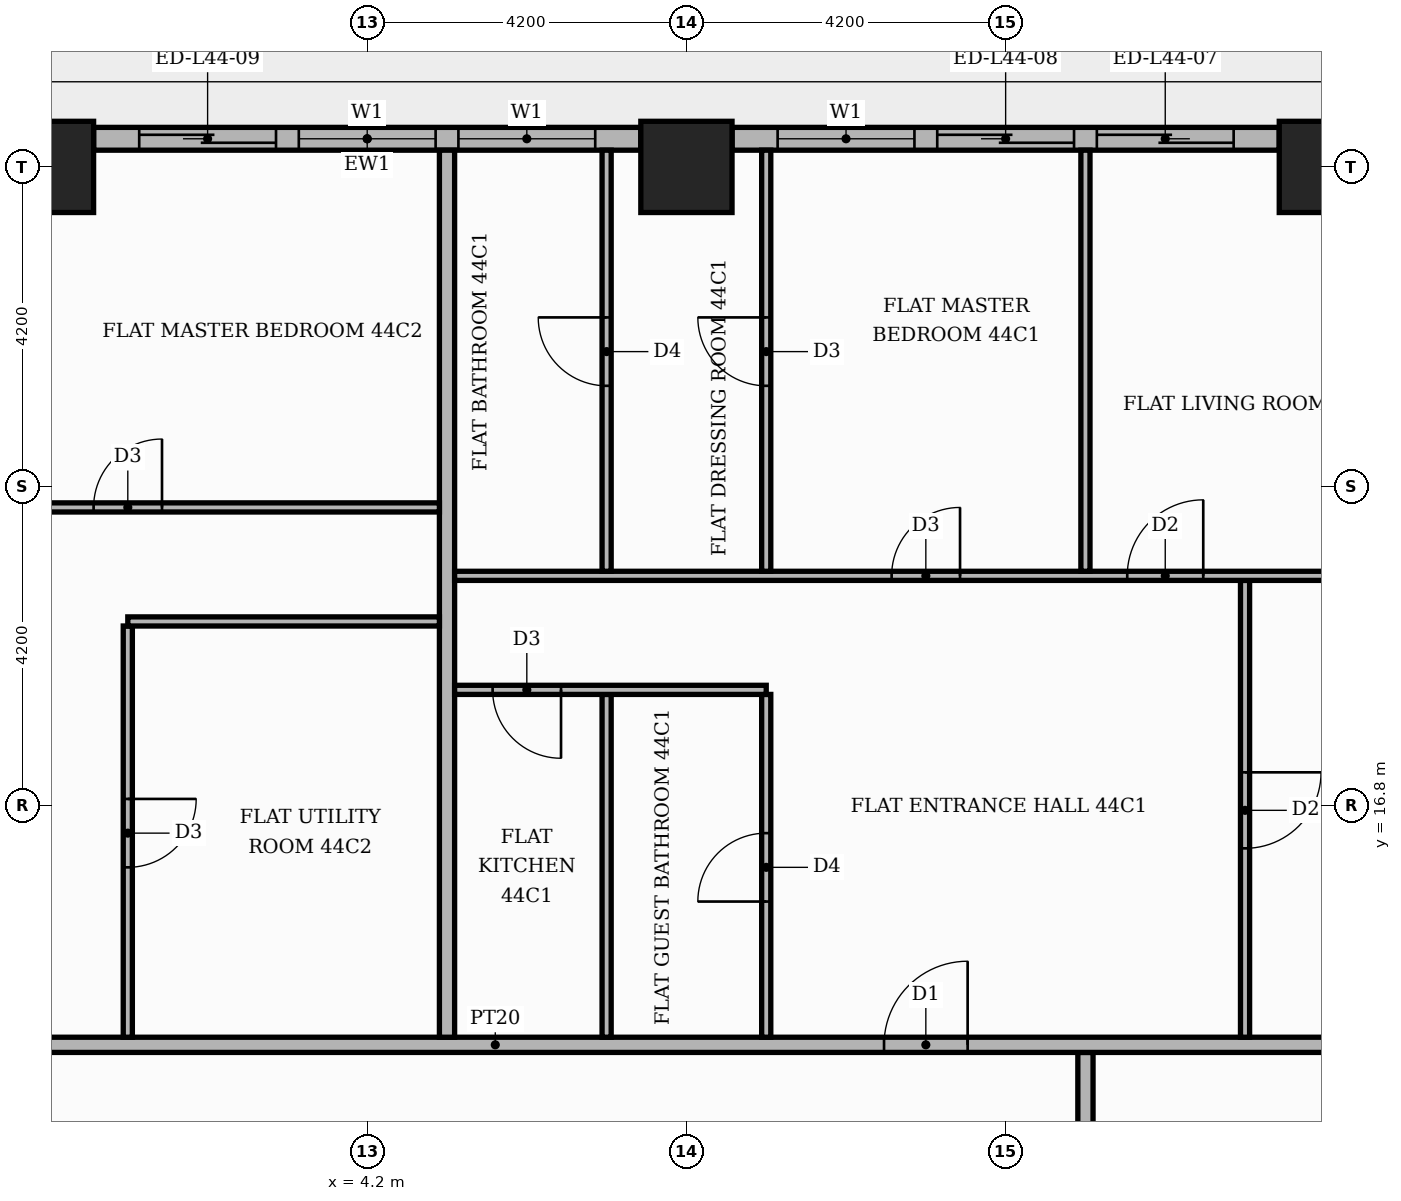
"""IFC4 building model, lengths in metres.
Left out: names, types, materials, properties, quantities, classifications, styles, units other than length and angle.
Written with IfcOpenShell. Run it as: python <this file> out.ifc"""

import sys

from ifc_helpers import new_model, si_unit, direction, frame, frame_2d, origin, origin_2d, place, context, subcontext, project, spatial, rectangle, extrude, element, fill, save


model = new_model("IFC4")
c1 = context("Model", 3, precision=1e-05, world=origin(), true_north=direction((0.0, 1.0)))
c2 = subcontext(c1, "Body", "Model", "MODEL_VIEW")
j1 = project(units=[si_unit("LENGTHUNIT", "METRE"), si_unit("PLANEANGLEUNIT", "RADIAN")], contexts=[c1])
p1 = place(None, origin())
s1 = spatial("IfcSite", under=j1, at=p1, CompositionType="ELEMENT")
p2 = place(p1, origin())
s2 = spatial("IfcBuilding", under=s1, at=p2, CompositionType="ELEMENT")
p3 = place(p2, frame((0.0, 0.0, 188.4)))
s3 = spatial("IfcBuildingStorey", under=s2, at=p3, CompositionType="ELEMENT", Elevation=188.4)
for number, where, z_axis, x_axis in (
    (1, (0.0, 25.2, -0.42), (0.0, 0.0, 1.0), (1.0, 0.0, 0.0)),
    (2, (8.4, 25.2, -0.42), (0.0, 0.0, 1.0), (1.0, 0.0, 0.0)),
):
    element("IfcColumn", number, at=place(p3, frame(where, z_axis=z_axis, x_axis=x_axis)), inside=s3, PredefinedType="COLUMN", context=c2, shape_type="SweptSolid", body=[
        extrude(rectangle(XDim=1.2, YDim=1.2, at=origin_2d()), origin(), (0.0, 0.0, 1.0), 4.32),
    ])
p4 = place(p3, frame((16.8, 25.2, 0.0), z_axis=(0.0, 0.0, 1.0), x_axis=(1.0, 0.0, 0.0)))
e3 = element("IfcColumn", 3, at=p4, inside=s3, PredefinedType="COLUMN", context=c2, shape_type="SweptSolid", body=[
    extrude(rectangle(XDim=1.2, YDim=1.2, at=origin_2d()), origin(), (0.0, 0.0, 1.0), 3.9),
])
p5 = place(p3, frame((16.2, 25.57, 0.0), z_axis=(0.0, 0.0, 1.0), x_axis=(-1.0, 0.0, 0.0)))
e4 = element("IfcWall", 4, at=p5, inside=s3, PredefinedType="STANDARD", context=c2, shape_type="SweptSolid", body=[
    extrude(rectangle(XDim=7.2, YDim=0.3, at=frame_2d((3.6, 0.0))), origin(), (0.0, 0.0, 1.0), 3.48),
])
p6 = place(p5, frame((0.6, 0.0, 0.0)))
e5 = element("IfcOpeningElement", 5, at=p6, cuts=e4, PredefinedType="OPENING", context=c2, shape_type="SweptSolid", body=[
    extrude(rectangle(XDim=1.8, YDim=2.4, at=frame_2d((0.9, 1.2))), frame((0.0, 0.16, 0.0), z_axis=(0.0, -1.0, 0.0), x_axis=(1.0, 0.0, 0.0)), (0.0, 0.0, 1.0), 0.32),
])
p7 = place(p5, frame((2.7, 0.0, 0.0)))
e6 = element("IfcOpeningElement", 6, at=p7, cuts=e4, PredefinedType="OPENING", context=c2, shape_type="SweptSolid", body=[
    extrude(rectangle(XDim=1.8, YDim=2.4, at=frame_2d((0.9, 1.2))), frame((0.0, 0.16, 0.0), z_axis=(0.0, -1.0, 0.0), x_axis=(1.0, 0.0, 0.0)), (0.0, 0.0, 1.0), 0.32),
])
p8 = place(p5, frame((4.8, 0.0, 0.9)))
e7 = element("IfcOpeningElement", 7, at=p8, cuts=e4, PredefinedType="OPENING", context=c2, shape_type="SweptSolid", body=[
    extrude(rectangle(XDim=1.8, YDim=2.1, at=frame_2d((0.9, 1.05))), frame((0.0, 0.16, 0.0), z_axis=(0.0, -1.0, 0.0), x_axis=(1.0, 0.0, 0.0)), (0.0, 0.0, 1.0), 0.32),
])
p9 = place(p3, frame((7.8, 25.57, 0.0), z_axis=(0.0, 0.0, 1.0), x_axis=(-1.0, 0.0, 0.0)))
e8 = element("IfcWall", 8, at=p9, inside=s3, PredefinedType="STANDARD", context=c2, shape_type="SweptSolid", body=[
    extrude(rectangle(XDim=7.2, YDim=0.3, at=frame_2d((3.6, 0.0))), origin(), (0.0, 0.0, 1.0), 3.48),
])
p10 = place(p9, frame((0.6, 0.0, 0.9)))
e9 = element("IfcOpeningElement", 9, at=p10, cuts=e8, PredefinedType="OPENING", context=c2, shape_type="SweptSolid", body=[
    extrude(rectangle(XDim=1.8, YDim=2.1, at=frame_2d((0.9, 1.05))), frame((0.0, 0.16, 0.0), z_axis=(0.0, -1.0, 0.0), x_axis=(1.0, 0.0, 0.0)), (0.0, 0.0, 1.0), 0.32),
])
p11 = place(p9, frame((2.7, 0.0, 0.9)))
e10 = element("IfcOpeningElement", 10, at=p11, cuts=e8, PredefinedType="OPENING", context=c2, shape_type="SweptSolid", body=[
    extrude(rectangle(XDim=1.8, YDim=2.1, at=frame_2d((0.9, 1.05))), frame((0.0, 0.16, 0.0), z_axis=(0.0, -1.0, 0.0), x_axis=(1.0, 0.0, 0.0)), (0.0, 0.0, 1.0), 0.32),
])
p12 = place(p9, frame((4.8, 0.0, 0.0)))
e11 = element("IfcOpeningElement", 11, at=p12, cuts=e8, PredefinedType="OPENING", context=c2, shape_type="SweptSolid", body=[
    extrude(rectangle(XDim=1.8, YDim=2.4, at=frame_2d((0.9, 1.2))), frame((0.0, 0.16, 0.0), z_axis=(0.0, -1.0, 0.0), x_axis=(1.0, 0.0, 0.0)), (0.0, 0.0, 1.0), 0.32),
])
p13 = place(p3, frame((13.65, 11.1, 0.0), z_axis=(0.0, 0.0, 1.0), x_axis=(0.0, 1.0, 0.0)))
e12 = element("IfcWall", 12, at=p13, inside=s3, PredefinedType="PARTITIONING", context=c2, shape_type="SweptSolid", body=[
    extrude(rectangle(XDim=2.45, YDim=0.2, at=frame_2d((1.225, 0.0))), origin(), (0.0, 0.0, 1.0), 3.48),
])
p14 = place(p3, frame((-13.65, 13.65, 0.0), z_axis=(0.0, 0.0, 1.0), x_axis=(1.0, 0.0, 0.0)))
e13 = element("IfcWall", 13, at=p14, inside=s3, PredefinedType="PARTITIONING", context=c2, shape_type="SweptSolid", body=[
    extrude(rectangle(XDim=39.07, YDim=0.2, at=frame_2d((19.535, 0.0))), origin(), (0.0, 0.0, 1.0), 3.48),
])
p15 = place(p14, frame((24.65, 0.0, 0.0)))
e14 = element("IfcOpeningElement", 14, at=p15, cuts=e13, PredefinedType="OPENING", context=c2, shape_type="SweptSolid", body=[
    extrude(rectangle(XDim=1.1, YDim=2.4, at=frame_2d((0.55, 1.2))), frame((0.0, 0.11, 0.0), z_axis=(0.0, -1.0, 0.0), x_axis=(1.0, 0.0, 0.0)), (0.0, 0.0, 1.0), 0.22),
])
p16 = place(p14, frame((12.05, 0.0, 0.0)))
e15 = element("IfcOpeningElement", 15, at=p16, cuts=e13, PredefinedType="OPENING", context=c2, shape_type="SweptSolid", body=[
    extrude(rectangle(XDim=1.1, YDim=2.4, at=frame_2d((0.55, 1.2))), frame((0.0, 0.11, 0.0), z_axis=(0.0, -1.0, 0.0), x_axis=(1.0, 0.0, 0.0)), (0.0, 0.0, 1.0), 0.22),
])
p17 = place(p3, frame((1.05, 13.75, 0.0), z_axis=(0.0, 0.0, 1.0), x_axis=(0.0, 1.0, 0.0)))
e16 = element("IfcWall", 16, at=p17, inside=s3, PredefinedType="PARTITIONING", context=c2, shape_type="SweptSolid", body=[
    extrude(rectangle(XDim=5.41, YDim=0.12, at=frame_2d((2.705, 0.0))), origin(), (0.0, 0.0, 1.0), 3.48),
])
p18 = place(p17, frame((2.235, 0.0, 0.0)))
e17 = element("IfcOpeningElement", 17, at=p18, cuts=e16, PredefinedType="OPENING", context=c2, shape_type="SweptSolid", body=[
    extrude(rectangle(XDim=0.9, YDim=2.1, at=frame_2d((0.45, 1.05))), frame((0.0, 0.07, 0.0), z_axis=(0.0, -1.0, 0.0), x_axis=(1.0, 0.0, 0.0)), (0.0, 0.0, 1.0), 0.14),
])
p19 = place(p3, frame((5.25, 13.75, 0.0), z_axis=(0.0, 0.0, 1.0), x_axis=(0.0, 1.0, 0.0)))
e18 = element("IfcWall", 18, at=p19, inside=s3, PredefinedType="PARTITIONING", context=c2, shape_type="SweptSolid", body=[
    extrude(rectangle(XDim=11.67, YDim=0.2, at=frame_2d((5.835, 0.0))), origin(), (0.0, 0.0, 1.0), 3.48),
])
p20 = place(p3, frame((7.35, 13.75, 0.0), z_axis=(0.0, 0.0, 1.0), x_axis=(0.0, 1.0, 0.0)))
e19 = element("IfcWall", 19, at=p20, inside=s3, PredefinedType="PARTITIONING", context=c2, shape_type="SweptSolid", body=[
    extrude(rectangle(XDim=4.51, YDim=0.12, at=frame_2d((2.255, 0.0))), origin(), (0.0, 0.0, 1.0), 3.48),
])
p21 = place(p3, frame((9.45, 13.75, 0.0), z_axis=(0.0, 0.0, 1.0), x_axis=(0.0, 1.0, 0.0)))
e20 = element("IfcWall", 20, at=p21, inside=s3, PredefinedType="PARTITIONING", context=c2, shape_type="SweptSolid", body=[
    extrude(rectangle(XDim=4.51, YDim=0.12, at=frame_2d((2.255, 0.0))), origin(), (0.0, 0.0, 1.0), 3.48),
])
p22 = place(p21, frame((1.785, 0.0, 0.0)))
e21 = element("IfcOpeningElement", 21, at=p22, cuts=e20, PredefinedType="OPENING", context=c2, shape_type="SweptSolid", body=[
    extrude(rectangle(XDim=0.9, YDim=2.1, at=frame_2d((0.45, 1.05))), frame((0.0, 0.07, 0.0), z_axis=(0.0, -1.0, 0.0), x_axis=(1.0, 0.0, 0.0)), (0.0, 0.0, 1.0), 0.14),
])
p23 = place(p3, frame((15.75, 13.75, 0.0), z_axis=(0.0, 0.0, 1.0), x_axis=(0.0, 1.0, 0.0)))
e22 = element("IfcWall", 22, at=p23, inside=s3, PredefinedType="PARTITIONING", context=c2, shape_type="SweptSolid", body=[
    extrude(rectangle(XDim=6.01, YDim=0.12, at=frame_2d((3.005, 0.0))), origin(), (0.0, 0.0, 1.0), 3.48),
])
p24 = place(p23, frame((2.485, 0.0, 0.0)))
e23 = element("IfcOpeningElement", 23, at=p24, cuts=e22, PredefinedType="OPENING", context=c2, shape_type="SweptSolid", body=[
    extrude(rectangle(XDim=1.0, YDim=2.1, at=frame_2d((0.5, 1.05))), frame((0.0, 0.07, 0.0), z_axis=(0.0, -1.0, 0.0), x_axis=(1.0, 0.0, 0.0)), (0.0, 0.0, 1.0), 0.14),
])
p25 = place(p3, frame((5.35, 18.32, 0.0), z_axis=(0.0, 0.0, 1.0), x_axis=(1.0, 0.0, 0.0)))
e24 = element("IfcWall", 24, at=p25, inside=s3, PredefinedType="PARTITIONING", context=c2, shape_type="SweptSolid", body=[
    extrude(rectangle(XDim=4.1, YDim=0.12, at=frame_2d((2.05, 0.0))), origin(), (0.0, 0.0, 1.0), 3.48),
])
p26 = place(p25, frame((0.5, 0.0, 0.0)))
e25 = element("IfcOpeningElement", 25, at=p26, cuts=e24, PredefinedType="OPENING", context=c2, shape_type="SweptSolid", body=[
    extrude(rectangle(XDim=0.9, YDim=2.1, at=frame_2d((0.45, 1.05))), frame((0.0, 0.07, 0.0), z_axis=(0.0, -1.0, 0.0), x_axis=(1.0, 0.0, 0.0)), (0.0, 0.0, 1.0), 0.14),
])
p27 = place(p3, frame((1.05, 19.22, 0.0), z_axis=(0.0, 0.0, 1.0), x_axis=(1.0, 0.0, 0.0)))
e26 = element("IfcWall", 26, at=p27, inside=s3, PredefinedType="PARTITIONING", context=c2, shape_type="SweptSolid", body=[
    extrude(rectangle(XDim=4.1, YDim=0.12, at=frame_2d((2.05, 0.0))), origin(), (0.0, 0.0, 1.0), 3.48),
])
p28 = place(p3, frame((5.35, 19.82, 0.0), z_axis=(0.0, 0.0, 1.0), x_axis=(1.0, 0.0, 0.0)))
e27 = element("IfcWall", 27, at=p28, inside=s3, PredefinedType="PARTITIONING", context=c2, shape_type="SweptSolid", body=[
    extrude(rectangle(XDim=12.25, YDim=0.12, at=frame_2d((6.125, 0.0))), origin(), (0.0, 0.0, 1.0), 3.48),
])
p29 = place(p28, frame((8.85, 0.0, 0.0)))
e28 = element("IfcOpeningElement", 28, at=p29, cuts=e27, PredefinedType="OPENING", context=c2, shape_type="SweptSolid", body=[
    extrude(rectangle(XDim=1.0, YDim=2.1, at=frame_2d((0.5, 1.05))), frame((0.0, 0.07, 0.0), z_axis=(0.0, -1.0, 0.0), x_axis=(1.0, 0.0, 0.0)), (0.0, 0.0, 1.0), 0.14),
])
p30 = place(p28, frame((5.75, 0.0, 0.0)))
e29 = element("IfcOpeningElement", 29, at=p30, cuts=e27, PredefinedType="OPENING", context=c2, shape_type="SweptSolid", body=[
    extrude(rectangle(XDim=0.9, YDim=2.1, at=frame_2d((0.45, 1.05))), frame((0.0, 0.07, 0.0), z_axis=(0.0, -1.0, 0.0), x_axis=(1.0, 0.0, 0.0)), (0.0, 0.0, 1.0), 0.14),
])
p31 = place(p3, frame((7.35, 19.88, 0.0), z_axis=(0.0, 0.0, 1.0), x_axis=(0.0, 1.0, 0.0)))
e30 = element("IfcWall", 30, at=p31, inside=s3, PredefinedType="PARTITIONING", context=c2, shape_type="SweptSolid", body=[
    extrude(rectangle(XDim=5.54, YDim=0.12, at=frame_2d((2.77, 0.0))), origin(), (0.0, 0.0, 1.0), 3.48),
])
p32 = place(p31, frame((2.44, 0.0, 0.0)))
e31 = element("IfcOpeningElement", 31, at=p32, cuts=e30, PredefinedType="OPENING", context=c2, shape_type="SweptSolid", body=[
    extrude(rectangle(XDim=0.9, YDim=2.1, at=frame_2d((0.45, 1.05))), frame((0.0, 0.07, 0.0), z_axis=(0.0, -1.0, 0.0), x_axis=(1.0, 0.0, 0.0)), (0.0, 0.0, 1.0), 0.14),
])
p33 = place(p3, frame((9.45, 19.88, 0.0), z_axis=(0.0, 0.0, 1.0), x_axis=(0.0, 1.0, 0.0)))
e32 = element("IfcWall", 32, at=p33, inside=s3, PredefinedType="PARTITIONING", context=c2, shape_type="SweptSolid", body=[
    extrude(rectangle(XDim=5.54, YDim=0.12, at=frame_2d((2.77, 0.0))), origin(), (0.0, 0.0, 1.0), 3.48),
])
p34 = place(p33, frame((2.44, 0.0, 0.0)))
e33 = element("IfcOpeningElement", 33, at=p34, cuts=e32, PredefinedType="OPENING", context=c2, shape_type="SweptSolid", body=[
    extrude(rectangle(XDim=0.9, YDim=2.1, at=frame_2d((0.45, 1.05))), frame((0.0, 0.07, 0.0), z_axis=(0.0, -1.0, 0.0), x_axis=(1.0, 0.0, 0.0)), (0.0, 0.0, 1.0), 0.14),
])
p35 = place(p3, frame((13.65, 19.88, 0.0), z_axis=(0.0, 0.0, 1.0), x_axis=(0.0, 1.0, 0.0)))
e34 = element("IfcWall", 34, at=p35, inside=s3, PredefinedType="PARTITIONING", context=c2, shape_type="SweptSolid", body=[
    extrude(rectangle(XDim=5.54, YDim=0.12, at=frame_2d((2.77, 0.0))), origin(), (0.0, 0.0, 1.0), 3.48),
])
p36 = place(p3, frame((-13.55, 20.72, 0.0), z_axis=(0.0, 0.0, 1.0), x_axis=(1.0, 0.0, 0.0)))
e35 = element("IfcWall", 35, at=p36, inside=s3, PredefinedType="PARTITIONING", context=c2, shape_type="SweptSolid", body=[
    extrude(rectangle(XDim=18.7, YDim=0.12, at=frame_2d((9.35, 0.0))), origin(), (0.0, 0.0, 1.0), 3.48),
])
p37 = place(p36, frame((14.15, 0.0, 0.0)))
e36 = element("IfcOpeningElement", 36, at=p37, cuts=e35, PredefinedType="OPENING", context=c2, shape_type="SweptSolid", body=[
    extrude(rectangle(XDim=0.9, YDim=2.1, at=frame_2d((0.45, 1.05))), frame((0.0, 0.07, 0.0), z_axis=(0.0, -1.0, 0.0), x_axis=(1.0, 0.0, 0.0)), (0.0, 0.0, 1.0), 0.14),
])
p38 = place(p36, frame((2.55, 0.0, 0.0)))
e37 = element("IfcOpeningElement", 37, at=p38, cuts=e35, PredefinedType="OPENING", context=c2, shape_type="SweptSolid", body=[
    extrude(rectangle(XDim=1.0, YDim=2.1, at=frame_2d((0.5, 1.05))), frame((0.0, 0.07, 0.0), z_axis=(0.0, -1.0, 0.0), x_axis=(1.0, 0.0, 0.0)), (0.0, 0.0, 1.0), 0.14),
])
p39 = place(p6, origin())
e38 = element("IfcDoor", 38, at=p39, inside=s3, OperationType="SLIDING_TO_LEFT", PredefinedType="DOOR", context=c2, shape_type="SweptSolid", body=[
    extrude(rectangle(XDim=1.8, YDim=2.4, at=frame_2d((0.9, 1.2))), frame((0.0, 0.025, 0.0), z_axis=(0.0, -1.0, 0.0), x_axis=(1.0, 0.0, 0.0)), (0.0, 0.0, 1.0), 0.05),
])
fill(e5, e38)
p40 = place(p7, origin())
e39 = element("IfcDoor", 39, at=p40, inside=s3, OperationType="SLIDING_TO_RIGHT", PredefinedType="DOOR", context=c2, shape_type="SweptSolid", body=[
    extrude(rectangle(XDim=1.8, YDim=2.4, at=frame_2d((0.9, 1.2))), frame((0.0, 0.025, 0.0), z_axis=(0.0, -1.0, 0.0), x_axis=(1.0, 0.0, 0.0)), (0.0, 0.0, 1.0), 0.05),
])
fill(e6, e39)
p41 = place(p8, origin())
e40 = element("IfcWindow", 40, at=p41, inside=s3, PartitioningType="SINGLE_PANEL", PredefinedType="WINDOW", context=c2, shape_type="SweptSolid", body=[
    extrude(rectangle(XDim=1.8, YDim=2.1, at=frame_2d((0.9, 1.05))), frame((0.0, 0.03, 0.0), z_axis=(0.0, -1.0, 0.0), x_axis=(1.0, 0.0, 0.0)), (0.0, 0.0, 1.0), 0.06),
])
fill(e7, e40)
p42 = place(p10, origin())
e41 = element("IfcWindow", 41, at=p42, inside=s3, PartitioningType="SINGLE_PANEL", PredefinedType="WINDOW", context=c2, shape_type="SweptSolid", body=[
    extrude(rectangle(XDim=1.8, YDim=2.1, at=frame_2d((0.9, 1.05))), frame((0.0, 0.03, 0.0), z_axis=(0.0, -1.0, 0.0), x_axis=(1.0, 0.0, 0.0)), (0.0, 0.0, 1.0), 0.06),
])
fill(e9, e41)
p43 = place(p11, origin())
e42 = element("IfcWindow", 42, at=p43, inside=s3, PartitioningType="SINGLE_PANEL", PredefinedType="WINDOW", context=c2, shape_type="SweptSolid", body=[
    extrude(rectangle(XDim=1.8, YDim=2.1, at=frame_2d((0.9, 1.05))), frame((0.0, 0.03, 0.0), z_axis=(0.0, -1.0, 0.0), x_axis=(1.0, 0.0, 0.0)), (0.0, 0.0, 1.0), 0.06),
])
fill(e10, e42)
p44 = place(p12, origin())
e43 = element("IfcDoor", 43, at=p44, inside=s3, OperationType="SLIDING_TO_RIGHT", PredefinedType="DOOR", context=c2, shape_type="SweptSolid", body=[
    extrude(rectangle(XDim=1.8, YDim=2.4, at=frame_2d((0.9, 1.2))), frame((0.0, 0.025, 0.0), z_axis=(0.0, -1.0, 0.0), x_axis=(1.0, 0.0, 0.0)), (0.0, 0.0, 1.0), 0.05),
])
fill(e11, e43)
p45 = place(p15, origin())
e44 = element("IfcDoor", 44, at=p45, inside=s3, OperationType="SINGLE_SWING_RIGHT", PredefinedType="DOOR", context=c2, shape_type="SweptSolid", body=[
    extrude(rectangle(XDim=1.1, YDim=2.4, at=frame_2d((0.55, 1.2))), frame((0.0, 0.025, 0.0), z_axis=(0.0, -1.0, 0.0), x_axis=(1.0, 0.0, 0.0)), (0.0, 0.0, 1.0), 0.05),
])
fill(e14, e44)
p46 = place(p24, frame((1.0, 0.0, 0.0), z_axis=(0.0, 0.0, 1.0), x_axis=(-1.0, 0.0, 0.0)))
e45 = element("IfcDoor", 45, at=p46, inside=s3, OperationType="SINGLE_SWING_RIGHT", PredefinedType="DOOR", context=c2, shape_type="SweptSolid", body=[
    extrude(rectangle(XDim=1.0, YDim=2.1, at=frame_2d((0.5, 1.05))), frame((0.0, 0.025, 0.0), z_axis=(0.0, -1.0, 0.0), x_axis=(1.0, 0.0, 0.0)), (0.0, 0.0, 1.0), 0.05),
])
fill(e23, e45)
p47 = place(p22, origin())
e46 = element("IfcDoor", 46, at=p47, inside=s3, OperationType="SINGLE_SWING_LEFT", PredefinedType="DOOR", context=c2, shape_type="SweptSolid", body=[
    extrude(rectangle(XDim=0.9, YDim=2.1, at=frame_2d((0.45, 1.05))), frame((0.0, 0.025, 0.0), z_axis=(0.0, -1.0, 0.0), x_axis=(1.0, 0.0, 0.0)), (0.0, 0.0, 1.0), 0.05),
])
fill(e21, e46)
p48 = place(p26, frame((0.9, 0.0, 0.0), z_axis=(0.0, 0.0, 1.0), x_axis=(-1.0, 0.0, 0.0)))
e47 = element("IfcDoor", 47, at=p48, inside=s3, OperationType="SINGLE_SWING_RIGHT", PredefinedType="DOOR", context=c2, shape_type="SweptSolid", body=[
    extrude(rectangle(XDim=0.9, YDim=2.1, at=frame_2d((0.45, 1.05))), frame((0.0, 0.025, 0.0), z_axis=(0.0, -1.0, 0.0), x_axis=(1.0, 0.0, 0.0)), (0.0, 0.0, 1.0), 0.05),
])
fill(e25, e47)
p49 = place(p29, origin())
e48 = element("IfcDoor", 48, at=p49, inside=s3, OperationType="SINGLE_SWING_RIGHT", PredefinedType="DOOR", context=c2, shape_type="SweptSolid", body=[
    extrude(rectangle(XDim=1.0, YDim=2.1, at=frame_2d((0.5, 1.05))), frame((0.0, 0.025, 0.0), z_axis=(0.0, -1.0, 0.0), x_axis=(1.0, 0.0, 0.0)), (0.0, 0.0, 1.0), 0.05),
])
fill(e28, e48)
p50 = place(p30, origin())
e49 = element("IfcDoor", 49, at=p50, inside=s3, OperationType="SINGLE_SWING_RIGHT", PredefinedType="DOOR", context=c2, shape_type="SweptSolid", body=[
    extrude(rectangle(XDim=0.9, YDim=2.1, at=frame_2d((0.45, 1.05))), frame((0.0, 0.025, 0.0), z_axis=(0.0, -1.0, 0.0), x_axis=(1.0, 0.0, 0.0)), (0.0, 0.0, 1.0), 0.05),
])
fill(e29, e49)
p51 = place(p34, origin())
e50 = element("IfcDoor", 50, at=p51, inside=s3, OperationType="SINGLE_SWING_RIGHT", PredefinedType="DOOR", context=c2, shape_type="SweptSolid", body=[
    extrude(rectangle(XDim=0.9, YDim=2.1, at=frame_2d((0.45, 1.05))), frame((0.0, 0.025, 0.0), z_axis=(0.0, -1.0, 0.0), x_axis=(1.0, 0.0, 0.0)), (0.0, 0.0, 1.0), 0.05),
])
fill(e33, e50)
p52 = place(p32, origin())
e51 = element("IfcDoor", 51, at=p52, inside=s3, OperationType="SINGLE_SWING_RIGHT", PredefinedType="DOOR", context=c2, shape_type="SweptSolid", body=[
    extrude(rectangle(XDim=0.9, YDim=2.1, at=frame_2d((0.45, 1.05))), frame((0.0, 0.025, 0.0), z_axis=(0.0, -1.0, 0.0), x_axis=(1.0, 0.0, 0.0)), (0.0, 0.0, 1.0), 0.05),
])
fill(e31, e51)
p53 = place(p18, frame((0.9, 0.0, 0.0), z_axis=(0.0, 0.0, 1.0), x_axis=(-1.0, 0.0, 0.0)))
e52 = element("IfcDoor", 52, at=p53, inside=s3, OperationType="SINGLE_SWING_RIGHT", PredefinedType="DOOR", context=c2, shape_type="SweptSolid", body=[
    extrude(rectangle(XDim=0.9, YDim=2.1, at=frame_2d((0.45, 1.05))), frame((0.0, 0.025, 0.0), z_axis=(0.0, -1.0, 0.0), x_axis=(1.0, 0.0, 0.0)), (0.0, 0.0, 1.0), 0.05),
])
fill(e17, e52)
p54 = place(p37, origin())
e53 = element("IfcDoor", 53, at=p54, inside=s3, OperationType="SINGLE_SWING_RIGHT", PredefinedType="DOOR", context=c2, shape_type="SweptSolid", body=[
    extrude(rectangle(XDim=0.9, YDim=2.1, at=frame_2d((0.45, 1.05))), frame((0.0, 0.025, 0.0), z_axis=(0.0, -1.0, 0.0), x_axis=(1.0, 0.0, 0.0)), (0.0, 0.0, 1.0), 0.05),
])
fill(e36, e53)
save(model, sys.argv[1])
